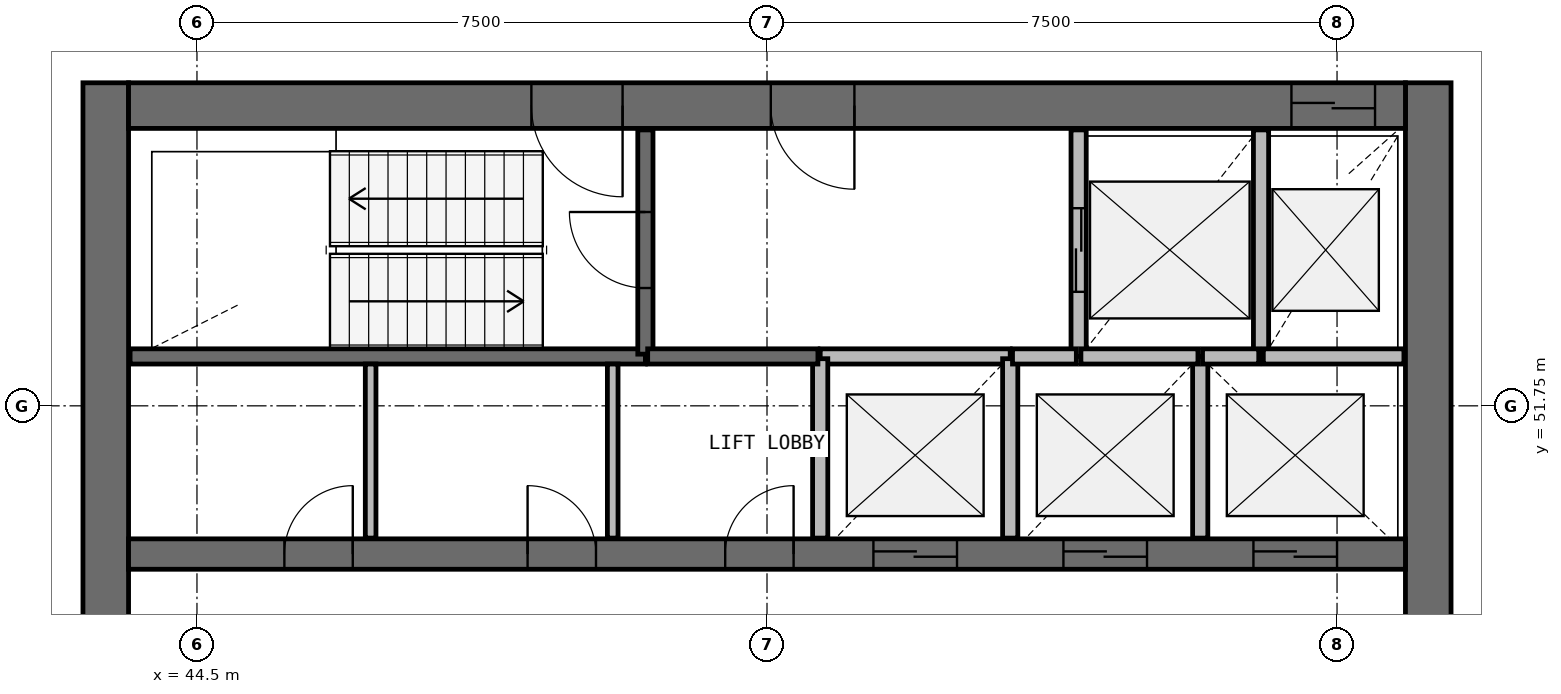
"""IFC4 building model, lengths in metres.
Left out: names, types, materials, properties, quantities, classifications, styles, units other than length and angle.
Written with IfcOpenShell. Run it as: python <this file> out.ifc"""

import sys

from ifc_helpers import new_model, si_unit, direction, frame, frame_2d, origin, place, context, subcontext, project, spatial, rectangle, extrude, source, transform, mapped, element, fill, save


model = new_model("IFC4")
c1 = context("Model", 3, precision=1e-05, world=origin(), true_north=direction((0.0, 1.0)))
c2 = subcontext(c1, "Body", "Model", "MODEL_VIEW")
j1 = project(units=[si_unit("LENGTHUNIT", "METRE"), si_unit("PLANEANGLEUNIT", "RADIAN")], contexts=[c1])
p1 = place(None, origin())
s1 = spatial("IfcSite", under=j1, at=p1, CompositionType="ELEMENT")
p2 = place(p1, origin())
s2 = spatial("IfcBuilding", under=s1, at=p2, CompositionType="ELEMENT")
p3 = place(p2, frame((0.0, 0.0, 215.0)))
s3 = spatial("IfcBuildingStorey", under=s2, at=p3, CompositionType="ELEMENT", Elevation=215.0)
p4 = place(p3, frame((60.7, 40.0, 0.0), z_axis=(0.0, 0.0, 1.0), x_axis=(0.0, 1.0, 0.0)))
e1 = element("IfcWall", 1, at=p4, inside=s3, PredefinedType="SHEAR", context=c2, shape_type="SweptSolid", body=[
    extrude(rectangle(XDim=16.0, YDim=0.6, at=frame_2d((8.0, 0.0))), origin(), (0.0, 0.0, 1.0), 3.9),
])
p5 = place(p4, frame((7.1, 0.0, 0.0)))
e2 = element("IfcOpeningElement", 2, at=p5, cuts=e1, PredefinedType="OPENING", context=c2, shape_type="SweptSolid", body=[
    extrude(rectangle(XDim=1.8, YDim=2.1, at=frame_2d((0.9, 1.05))), frame((0.0, 0.31, 0.0), z_axis=(0.0, -1.0, 0.0), x_axis=(1.0, 0.0, 0.0)), (0.0, 0.0, 1.0), 0.62),
])
p6 = place(p3, frame((43.3, 56.0, 0.0), z_axis=(0.0, 0.0, 1.0), x_axis=(0.0, -1.0, 0.0)))
e3 = element("IfcWall", 3, at=p6, inside=s3, PredefinedType="SHEAR", context=c2, shape_type="SweptSolid", body=[
    extrude(rectangle(XDim=16.0, YDim=0.6, at=frame_2d((8.0, 0.0))), origin(), (0.0, 0.0, 1.0), 3.9),
])
p7 = place(p6, frame((7.1, 0.0, 0.0)))
e4 = element("IfcOpeningElement", 4, at=p7, cuts=e3, PredefinedType="OPENING", context=c2, shape_type="SweptSolid", body=[
    extrude(rectangle(XDim=1.8, YDim=2.1, at=frame_2d((0.9, 1.05))), frame((0.0, 0.31, 0.0), z_axis=(0.0, -1.0, 0.0), x_axis=(1.0, 0.0, 0.0)), (0.0, 0.0, 1.0), 0.62),
])
p8 = place(p3, frame((60.4, 55.7, 0.0), z_axis=(0.0, 0.0, 1.0), x_axis=(-1.0, 0.0, 0.0)))
e5 = element("IfcWall", 5, at=p8, inside=s3, PredefinedType="SHEAR", context=c2, shape_type="SweptSolid", body=[
    extrude(rectangle(XDim=16.8, YDim=0.6, at=frame_2d((8.4, 0.0))), origin(), (0.0, 0.0, 1.0), 3.9),
])
p9 = place(p8, frame((0.4, 0.0, 0.0)))
e6 = element("IfcOpeningElement", 6, at=p9, cuts=e5, PredefinedType="OPENING", context=c2, shape_type="SweptSolid", body=[
    extrude(rectangle(XDim=1.1, YDim=2.1, at=frame_2d((0.55, 1.05))), frame((0.0, 0.31, 0.0), z_axis=(0.0, -1.0, 0.0), x_axis=(1.0, 0.0, 0.0)), (0.0, 0.0, 1.0), 0.62),
])
p10 = place(p8, frame((10.3, 0.0, 0.0)))
e7 = element("IfcOpeningElement", 7, at=p10, cuts=e5, PredefinedType="OPENING", context=c2, shape_type="SweptSolid", body=[
    extrude(rectangle(XDim=1.2, YDim=2.1, at=frame_2d((0.6, 1.05))), frame((0.0, 0.31, 0.0), z_axis=(0.0, -1.0, 0.0), x_axis=(1.0, 0.0, 0.0)), (0.0, 0.0, 1.0), 0.62),
])
p11 = place(p8, frame((7.25, 0.0, 0.0)))
e8 = element("IfcOpeningElement", 8, at=p11, cuts=e5, PredefinedType="OPENING", context=c2, shape_type="SweptSolid", body=[
    extrude(rectangle(XDim=1.1, YDim=2.1, at=frame_2d((0.55, 1.05))), frame((0.0, 0.31, 0.0), z_axis=(0.0, -1.0, 0.0), x_axis=(1.0, 0.0, 0.0)), (0.0, 0.0, 1.0), 0.62),
])
p12 = place(p3, frame((43.6, 49.8, 0.0), z_axis=(0.0, 0.0, 1.0), x_axis=(1.0, 0.0, 0.0)))
e9 = element("IfcWall", 9, at=p12, inside=s3, PredefinedType="SHEAR", context=c2, shape_type="SweptSolid", body=[
    extrude(rectangle(XDim=16.8, YDim=0.4, at=frame_2d((8.4, 0.0))), origin(), (0.0, 0.0, 1.0), 3.9),
])
p13 = place(p12, frame((9.8, 0.0, 0.0)))
e10 = element("IfcOpeningElement", 10, at=p13, cuts=e9, PredefinedType="OPENING", context=c2, shape_type="SweptSolid", body=[
    extrude(rectangle(XDim=1.1, YDim=2.1, at=frame_2d((0.55, 1.05))), frame((0.0, 0.21, 0.0), z_axis=(0.0, -1.0, 0.0), x_axis=(1.0, 0.0, 0.0)), (0.0, 0.0, 1.0), 0.42),
])
p14 = place(p12, frame((12.3, 0.0, 0.0)))
e11 = element("IfcOpeningElement", 11, at=p14, cuts=e9, PredefinedType="OPENING", context=c2, shape_type="SweptSolid", body=[
    extrude(rectangle(XDim=1.1, YDim=2.1, at=frame_2d((0.55, 1.05))), frame((0.0, 0.21, 0.0), z_axis=(0.0, -1.0, 0.0), x_axis=(1.0, 0.0, 0.0)), (0.0, 0.0, 1.0), 0.42),
])
p15 = place(p12, frame((14.8, 0.0, 0.0)))
e12 = element("IfcOpeningElement", 12, at=p15, cuts=e9, PredefinedType="OPENING", context=c2, shape_type="SweptSolid", body=[
    extrude(rectangle(XDim=1.1, YDim=2.1, at=frame_2d((0.55, 1.05))), frame((0.0, 0.21, 0.0), z_axis=(0.0, -1.0, 0.0), x_axis=(1.0, 0.0, 0.0)), (0.0, 0.0, 1.0), 0.42),
])
p16 = place(p12, frame((2.05, 0.0, 0.0)))
e13 = element("IfcOpeningElement", 13, at=p16, cuts=e9, PredefinedType="OPENING", context=c2, shape_type="SweptSolid", body=[
    extrude(rectangle(XDim=0.9, YDim=2.1, at=frame_2d((0.45, 1.05))), frame((0.0, 0.21, 0.0), z_axis=(0.0, -1.0, 0.0), x_axis=(1.0, 0.0, 0.0)), (0.0, 0.0, 1.0), 0.42),
])
p17 = place(p12, frame((5.25, 0.0, 0.0)))
e14 = element("IfcOpeningElement", 14, at=p17, cuts=e9, PredefinedType="OPENING", context=c2, shape_type="SweptSolid", body=[
    extrude(rectangle(XDim=0.9, YDim=2.1, at=frame_2d((0.45, 1.05))), frame((0.0, 0.21, 0.0), z_axis=(0.0, -1.0, 0.0), x_axis=(1.0, 0.0, 0.0)), (0.0, 0.0, 1.0), 0.42),
])
p18 = place(p12, frame((7.85, 0.0, 0.0)))
e15 = element("IfcOpeningElement", 15, at=p18, cuts=e9, PredefinedType="OPENING", context=c2, shape_type="SweptSolid", body=[
    extrude(rectangle(XDim=0.9, YDim=2.1, at=frame_2d((0.45, 1.05))), frame((0.0, 0.21, 0.0), z_axis=(0.0, -1.0, 0.0), x_axis=(1.0, 0.0, 0.0)), (0.0, 0.0, 1.0), 0.42),
])
p19 = place(p3, frame((43.62, 52.4, 0.0), z_axis=(0.0, 0.0, 1.0), x_axis=(1.0, 0.0, 0.0)))
e16 = element("IfcWall", 16, at=p19, inside=s3, PredefinedType="SOLIDWALL", context=c2, shape_type="SweptSolid", body=[
    extrude(rectangle(XDim=6.78, YDim=0.2, at=frame_2d((3.39, 0.0))), origin(), (0.0, 0.0, 1.0), 3.58),
])
p20 = place(p3, frame((50.4, 52.43, 0.0), z_axis=(0.0, 0.0, 1.0), x_axis=(0.0, 1.0, 0.0)))
e17 = element("IfcWall", 17, at=p20, inside=s3, PredefinedType="SOLIDWALL", context=c2, shape_type="SweptSolid", body=[
    extrude(rectangle(XDim=2.95, YDim=0.2, at=frame_2d((1.475, 0.0))), origin(), (0.0, 0.0, 1.0), 3.58),
])
p21 = place(p20, frame((0.87, 0.0, 0.0)))
e18 = element("IfcOpeningElement", 18, at=p21, cuts=e17, PredefinedType="OPENING", context=c2, shape_type="SweptSolid", body=[
    extrude(rectangle(XDim=1.0, YDim=2.1, at=frame_2d((0.5, 1.05))), frame((0.0, 0.11, 0.0), z_axis=(0.0, -1.0, 0.0), x_axis=(1.0, 0.0, 0.0)), (0.0, 0.0, 1.0), 0.22),
])
p22 = place(p3, frame((56.1, 55.38, 0.0), z_axis=(0.0, 0.0, 1.0), x_axis=(0.0, -1.0, 0.0)))
e19 = element("IfcWall", 19, at=p22, inside=s3, PredefinedType="SOLIDWALL", context=c2, shape_type="SweptSolid", body=[
    extrude(rectangle(XDim=2.98, YDim=0.2, at=frame_2d((1.49, 0.0))), origin(), (0.0, 0.0, 1.0), 3.58),
])
p23 = place(p22, frame((1.03, 0.0, 0.0)))
e20 = element("IfcOpeningElement", 20, at=p23, cuts=e19, PredefinedType="OPENING", context=c2, shape_type="SweptSolid", body=[
    extrude(rectangle(XDim=1.1, YDim=2.1, at=frame_2d((0.55, 1.05))), frame((0.0, 0.11, 0.0), z_axis=(0.0, -1.0, 0.0), x_axis=(1.0, 0.0, 0.0)), (0.0, 0.0, 1.0), 0.22),
])
p24 = place(p3, frame((58.5, 52.4, 0.0), z_axis=(0.0, 0.0, 1.0), x_axis=(0.0, 1.0, 0.0)))
e21 = element("IfcWall", 21, at=p24, inside=s3, PredefinedType="SOLIDWALL", context=c2, shape_type="SweptSolid", body=[
    extrude(rectangle(XDim=2.98, YDim=0.2, at=frame_2d((1.49, 0.0))), origin(), (0.0, 0.0, 1.0), 3.58),
])
p25 = place(p3, frame((55.2, 52.4, 0.0), z_axis=(0.0, 0.0, 1.0), x_axis=(-1.0, 0.0, 0.0)))
e22 = element("IfcWall", 22, at=p25, inside=s3, PredefinedType="SOLIDWALL", context=c2, shape_type="SweptSolid", body=[
    extrude(rectangle(XDim=2.5, YDim=0.2, at=frame_2d((1.25, 0.0))), origin(), (0.0, 0.0, 1.0), 3.58),
])
for number, where, z_axis, x_axis in (
    (23, (52.7, 52.37, 0.0), (0.0, 0.0, 1.0), (0.0, -1.0, 0.0)),
    (24, (55.2, 50.01, 0.0), (0.0, 0.0, 1.0), (0.0, 1.0, 0.0)),
):
    element("IfcWall", number, at=place(p3, frame(where, z_axis=z_axis, x_axis=x_axis)), inside=s3, PredefinedType="SOLIDWALL", context=c2, shape_type="SweptSolid", body=[
        extrude(rectangle(XDim=2.36, YDim=0.2, at=frame_2d((1.18, 0.0))), origin(), (0.0, 0.0, 1.0), 3.58),
    ])
p26 = place(p3, frame((57.7, 50.01, 0.0), z_axis=(0.0, 0.0, 1.0), x_axis=(0.0, 1.0, 0.0)))
e25 = element("IfcWall", 25, at=p26, inside=s3, PredefinedType="SOLIDWALL", context=c2, shape_type="SweptSolid", body=[
    extrude(rectangle(XDim=2.39, YDim=0.2, at=frame_2d((1.195, 0.0))), origin(), (0.0, 0.0, 1.0), 3.58),
])
p27 = place(p3, frame((50.43, 52.4, 0.0), z_axis=(0.0, 0.0, 1.0), x_axis=(1.0, 0.0, 0.0)))
e26 = element("IfcWall", 26, at=p27, inside=s3, PredefinedType="SOLIDWALL", context=c2, shape_type="SweptSolid", body=[
    extrude(rectangle(XDim=2.24, YDim=0.2, at=frame_2d((1.12, 0.0))), origin(), (0.0, 0.0, 1.0), 3.58),
])
p28 = place(p3, frame((60.38, 52.4, 0.0), z_axis=(0.0, 0.0, 1.0), x_axis=(-1.0, 0.0, 0.0)))
e27 = element("IfcWall", 27, at=p28, inside=s3, PredefinedType="SOLIDWALL", context=c2, shape_type="SweptSolid", body=[
    extrude(rectangle(XDim=1.85, YDim=0.2, at=frame_2d((0.925, 0.0))), origin(), (0.0, 0.0, 1.0), 3.58),
])
p29 = place(p3, frame((57.67, 52.4, 0.0), z_axis=(0.0, 0.0, 1.0), x_axis=(-1.0, 0.0, 0.0)))
e28 = element("IfcWall", 28, at=p29, inside=s3, PredefinedType="SOLIDWALL", context=c2, shape_type="SweptSolid", body=[
    extrude(rectangle(XDim=1.54, YDim=0.2, at=frame_2d((0.77, 0.0))), origin(), (0.0, 0.0, 1.0), 3.58),
])
p30 = place(p3, frame((56.07, 52.4, 0.0), z_axis=(0.0, 0.0, 1.0), x_axis=(-1.0, 0.0, 0.0)))
e29 = element("IfcWall", 29, at=p30, inside=s3, PredefinedType="SOLIDWALL", context=c2, shape_type="SweptSolid", body=[
    extrude(rectangle(XDim=0.84, YDim=0.2, at=frame_2d((0.42, 0.0))), origin(), (0.0, 0.0, 1.0), 3.58),
])
p31 = place(p3, frame((58.47, 52.4, 0.0), z_axis=(0.0, 0.0, 1.0), x_axis=(-1.0, 0.0, 0.0)))
e30 = element("IfcWall", 30, at=p31, inside=s3, PredefinedType="SOLIDWALL", context=c2, shape_type="SweptSolid", body=[
    extrude(rectangle(XDim=0.74, YDim=0.2, at=frame_2d((0.37, 0.0))), origin(), (0.0, 0.0, 1.0), 3.58),
])
for number, where, z_axis, x_axis in (
    (31, (46.785, 50.01, 0.0), (0.0, 0.0, 1.0), (0.0, 1.0, 0.0)),
    (32, (49.97, 50.01, 0.0), (0.0, 0.0, 1.0), (0.0, 1.0, 0.0)),
):
    element("IfcWall", number, at=place(p3, frame(where, z_axis=z_axis, x_axis=x_axis)), inside=s3, PredefinedType="PARTITIONING", context=c2, shape_type="SweptSolid", body=[
        extrude(rectangle(XDim=2.29, YDim=0.14, at=frame_2d((1.145, 0.0))), origin(), (0.0, 0.0, 1.0), 2.88),
    ])
m1 = source(origin(), c2, "Body", "SweptSolid", [
    extrude(rectangle(XDim=1.1, YDim=2.1, at=frame_2d((0.55, 1.05))), frame((0.0, 0.025, 0.0), z_axis=(0.0, -1.0, 0.0), x_axis=(1.0, 0.0, 0.0)), (0.0, 0.0, 1.0), 0.05),
])
p32 = place(p13, origin())
e33 = element("IfcDoor", 33, at=p32, inside=s3, OperationType="DOUBLE_DOOR_SLIDING", PredefinedType="USERDEFINED", context=c2, shape_type="MappedRepresentation", body=[
    mapped(m1, transform((0.0, 0.0, 0.0), scale=1.0)),
])
fill(e10, e33)
p33 = place(p14, origin())
e34 = element("IfcDoor", 34, at=p33, inside=s3, OperationType="DOUBLE_DOOR_SLIDING", PredefinedType="USERDEFINED", context=c2, shape_type="MappedRepresentation", body=[
    mapped(m1, transform((0.0, 0.0, 0.0), scale=1.0)),
])
fill(e11, e34)
p34 = place(p15, origin())
e35 = element("IfcDoor", 35, at=p34, inside=s3, OperationType="DOUBLE_DOOR_SLIDING", PredefinedType="USERDEFINED", context=c2, shape_type="MappedRepresentation", body=[
    mapped(m1, transform((0.0, 0.0, 0.0), scale=1.0)),
])
fill(e12, e35)
p35 = place(p23, origin())
e36 = element("IfcDoor", 36, at=p35, inside=s3, OperationType="DOUBLE_DOOR_SLIDING", PredefinedType="USERDEFINED", context=c2, shape_type="MappedRepresentation", body=[
    mapped(m1, transform((0.0, 0.0, 0.0), scale=1.0)),
])
fill(e20, e36)
p36 = place(p9, origin())
e37 = element("IfcDoor", 37, at=p36, inside=s3, OperationType="DOUBLE_DOOR_SLIDING", PredefinedType="USERDEFINED", context=c2, shape_type="MappedRepresentation", body=[
    mapped(m1, transform((0.0, 0.0, 0.0), scale=1.0)),
])
fill(e6, e37)
m2 = source(origin(), c2, "Body", "SweptSolid", [
    extrude(rectangle(XDim=1.2, YDim=2.1, at=frame_2d((0.6, 1.05))), frame((0.0, 0.025, 0.0), z_axis=(0.0, -1.0, 0.0), x_axis=(1.0, 0.0, 0.0)), (0.0, 0.0, 1.0), 0.05),
])
p37 = place(p10, origin())
e38 = element("IfcDoor", 38, at=p37, inside=s3, OperationType="SINGLE_SWING_LEFT", PredefinedType="DOOR", context=c2, shape_type="MappedRepresentation", body=[
    mapped(m2, transform((0.0, 0.0, 0.0), scale=1.0)),
])
fill(e7, e38)
m3 = source(origin(), c2, "Body", "SweptSolid", [
    extrude(rectangle(XDim=1.0, YDim=2.1, at=frame_2d((0.5, 1.05))), frame((0.0, 0.025, 0.0), z_axis=(0.0, -1.0, 0.0), x_axis=(1.0, 0.0, 0.0)), (0.0, 0.0, 1.0), 0.05),
])
p38 = place(p21, origin())
e39 = element("IfcDoor", 39, at=p38, inside=s3, OperationType="SINGLE_SWING_RIGHT", PredefinedType="DOOR", context=c2, shape_type="MappedRepresentation", body=[
    mapped(m3, transform((0.0, 0.0, 0.0), scale=1.0)),
])
fill(e18, e39)
m4 = source(origin(), c2, "Body", "SweptSolid", [
    extrude(rectangle(XDim=1.1, YDim=2.1, at=frame_2d((0.55, 1.05))), frame((0.0, 0.025, 0.0), z_axis=(0.0, -1.0, 0.0), x_axis=(1.0, 0.0, 0.0)), (0.0, 0.0, 1.0), 0.05),
])
p39 = place(p11, origin())
e40 = element("IfcDoor", 40, at=p39, inside=s3, OperationType="SINGLE_SWING_LEFT", PredefinedType="DOOR", context=c2, shape_type="MappedRepresentation", body=[
    mapped(m4, transform((0.0, 0.0, 0.0), scale=1.0)),
])
fill(e8, e40)
m5 = source(origin(), c2, "Body", "SweptSolid", [
    extrude(rectangle(XDim=0.9, YDim=2.1, at=frame_2d((0.45, 1.05))), frame((0.0, 0.025, 0.0), z_axis=(0.0, -1.0, 0.0), x_axis=(1.0, 0.0, 0.0)), (0.0, 0.0, 1.0), 0.05),
])
p40 = place(p16, origin())
e41 = element("IfcDoor", 41, at=p40, inside=s3, OperationType="SINGLE_SWING_RIGHT", PredefinedType="DOOR", context=c2, shape_type="MappedRepresentation", body=[
    mapped(m5, transform((0.0, 0.0, 0.0), scale=1.0)),
])
fill(e13, e41)
p41 = place(p17, origin())
e42 = element("IfcDoor", 42, at=p41, inside=s3, OperationType="SINGLE_SWING_LEFT", PredefinedType="DOOR", context=c2, shape_type="MappedRepresentation", body=[
    mapped(m5, transform((0.0, 0.0, 0.0), scale=1.0)),
])
fill(e14, e42)
p42 = place(p18, origin())
e43 = element("IfcDoor", 43, at=p42, inside=s3, OperationType="SINGLE_SWING_RIGHT", PredefinedType="DOOR", context=c2, shape_type="MappedRepresentation", body=[
    mapped(m5, transform((0.0, 0.0, 0.0), scale=1.0)),
])
fill(e15, e43)
save(model, sys.argv[1])
